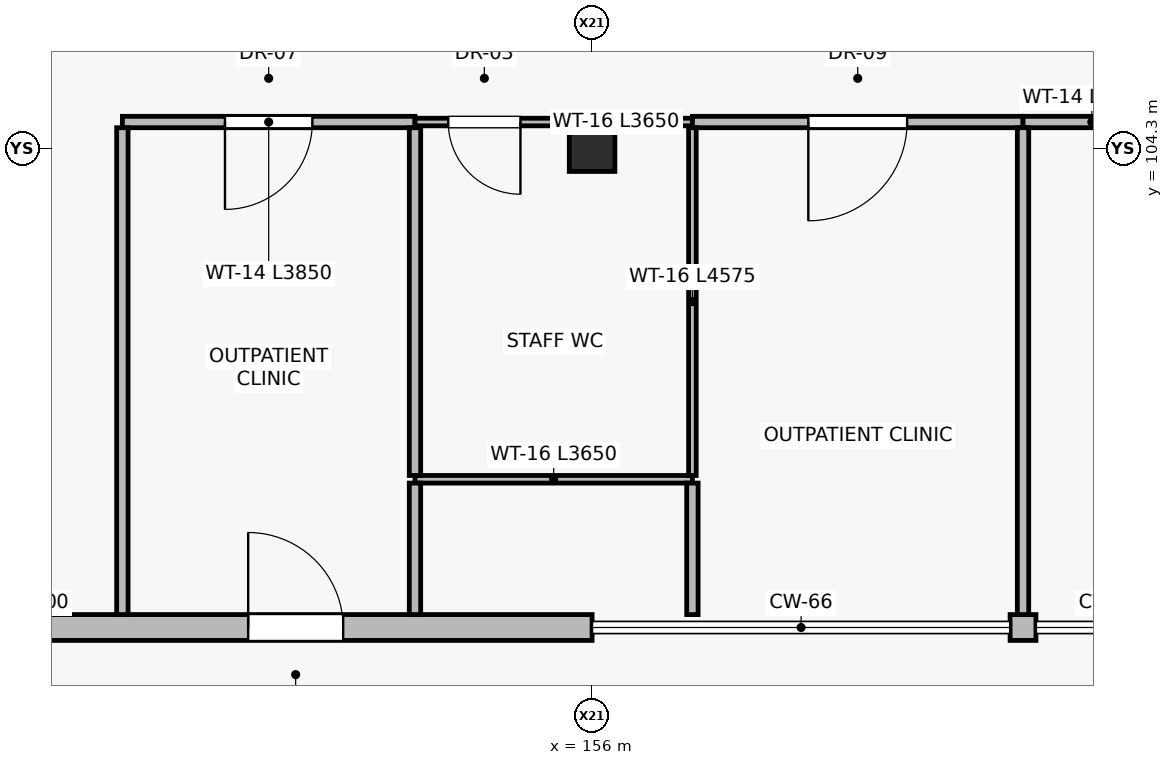
"""IFC4 building model, lengths in metres.
Left out: names, types, materials, properties, quantities, classifications, styles, units other than length and angle.
Written with IfcOpenShell. Run it as: python <this file> out.ifc"""

import sys

from ifc_helpers import new_model, si_unit, direction, frame, frame_2d, origin, origin_2d, place, context, subcontext, project, spatial, rectangle, extrude, element, fill, save


model = new_model("IFC4")
c1 = context("Model", 3, precision=1e-05, world=origin(), true_north=direction((0.0, 1.0)))
c2 = subcontext(c1, "Body", "Model", "MODEL_VIEW")
j1 = project(units=[si_unit("LENGTHUNIT", "METRE"), si_unit("PLANEANGLEUNIT", "RADIAN")], contexts=[c1])
p1 = place(None, origin())
s1 = spatial("IfcSite", under=j1, at=p1, CompositionType="ELEMENT")
p2 = place(p1, origin())
s2 = spatial("IfcBuilding", under=s1, at=p2, CompositionType="ELEMENT")
p3 = place(p2, frame((0.0, 0.0, 4.8)))
s3 = spatial("IfcBuildingStorey", under=s2, at=p3, CompositionType="ELEMENT", Elevation=4.8)
p4 = place(p3, frame((156.0, 104.3, 0.0), z_axis=(0.0, 0.0, 1.0), x_axis=(1.0, 0.0, 0.0)))
e1 = element("IfcColumn", 1, at=p4, inside=s3, PredefinedType="COLUMN", context=c2, shape_type="SweptSolid", body=[
    extrude(rectangle(XDim=0.6, YDim=0.6, at=origin_2d()), origin(), (0.0, 0.0, 1.0), 4.8),
])
p5 = place(p3, frame((156.0, 98.0, 0.0), z_axis=(0.0, 0.0, 1.0), x_axis=(-1.0, 0.0, 0.0)))
e2 = element("IfcWall", 2, at=p5, inside=s3, PredefinedType="STANDARD", context=c2, shape_type="SweptSolid", body=[
    extrude(rectangle(XDim=7.8, YDim=0.34, at=frame_2d((3.9, 0.0))), origin(), (0.0, 0.0, 1.0), 4.54),
])
p6 = place(p5, frame((3.275, 0.0, 0.0)))
e3 = element("IfcOpeningElement", 3, at=p6, cuts=e2, PredefinedType="OPENING", context=c2, shape_type="SweptSolid", body=[
    extrude(rectangle(XDim=1.25, YDim=2.2, at=frame_2d((0.625, 1.1))), frame((0.0, 0.18, 0.0), z_axis=(0.0, -1.0, 0.0), x_axis=(1.0, 0.0, 0.0)), (0.0, 0.0, 1.0), 0.36),
])
p7 = place(p3, frame((161.84, 98.0, 0.0), z_axis=(0.0, 0.0, 1.0), x_axis=(-1.0, 0.0, 0.0)))
e4 = element("IfcWall", 4, at=p7, inside=s3, PredefinedType="STANDARD", context=c2, shape_type="SweptSolid", body=[
    extrude(rectangle(XDim=0.34, YDim=0.34, at=frame_2d((0.17, 0.0))), origin(), (0.0, 0.0, 1.0), 4.54),
])
p8 = place(p3, frame((153.67, 104.65, 0.0), z_axis=(0.0, 0.0, 1.0), x_axis=(-1.0, 0.0, 0.0)))
e5 = element("IfcWall", 5, at=p8, inside=s3, PredefinedType="PARTITIONING", context=c2, shape_type="SweptSolid", body=[
    extrude(rectangle(XDim=3.85, YDim=0.15, at=frame_2d((1.925, 0.0))), origin(), (0.0, 0.0, 1.0), 4.04),
])
p9 = place(p8, frame((1.35, 0.0, 0.0)))
e6 = element("IfcOpeningElement", 6, at=p9, cuts=e5, PredefinedType="OPENING", context=c2, shape_type="SweptSolid", body=[
    extrude(rectangle(XDim=1.15, YDim=2.2, at=frame_2d((0.575, 1.1))), frame((0.0, 0.085, 0.0), z_axis=(0.0, -1.0, 0.0), x_axis=(1.0, 0.0, 0.0)), (0.0, 0.0, 1.0), 0.17),
])
p10 = place(p3, frame((157.32, 104.65, 0.0), z_axis=(0.0, 0.0, 1.0), x_axis=(-1.0, 0.0, 0.0)))
e7 = element("IfcWall", 7, at=p10, inside=s3, PredefinedType="PARTITIONING", context=c2, shape_type="SweptSolid", body=[
    extrude(rectangle(XDim=3.65, YDim=0.1, at=frame_2d((1.825, 0.0))), origin(), (0.0, 0.0, 1.0), 4.04),
])
p11 = place(p10, frame((2.262, 0.0, 0.0)))
e8 = element("IfcOpeningElement", 8, at=p11, cuts=e7, PredefinedType="OPENING", context=c2, shape_type="SweptSolid", body=[
    extrude(rectangle(XDim=0.95, YDim=2.1, at=frame_2d((0.475, 1.05))), frame((0.0, 0.06, 0.0), z_axis=(0.0, -1.0, 0.0), x_axis=(1.0, 0.0, 0.0)), (0.0, 0.0, 1.0), 0.12),
])
p12 = place(p3, frame((153.67, 99.95, 0.0), z_axis=(0.0, 0.0, 1.0), x_axis=(1.0, 0.0, 0.0)))
e9 = element("IfcWall", 9, at=p12, inside=s3, PredefinedType="PARTITIONING", context=c2, shape_type="SweptSolid", body=[
    extrude(rectangle(XDim=3.65, YDim=0.1, at=frame_2d((1.825, 0.0))), origin(), (0.0, 0.0, 1.0), 4.54),
])
p13 = place(p3, frame((161.67, 104.65, 0.0), z_axis=(0.0, 0.0, 1.0), x_axis=(-1.0, 0.0, 0.0)))
e10 = element("IfcWall", 10, at=p13, inside=s3, PredefinedType="PARTITIONING", context=c2, shape_type="SweptSolid", body=[
    extrude(rectangle(XDim=4.35, YDim=0.15, at=frame_2d((2.175, 0.0))), origin(), (0.0, 0.0, 1.0), 4.04),
])
p14 = place(p13, frame((1.525, 0.0, 0.0)))
e11 = element("IfcOpeningElement", 11, at=p14, cuts=e10, PredefinedType="OPENING", context=c2, shape_type="SweptSolid", body=[
    extrude(rectangle(XDim=1.3, YDim=2.2, at=frame_2d((0.65, 1.1))), frame((0.0, 0.085, 0.0), z_axis=(0.0, -1.0, 0.0), x_axis=(1.0, 0.0, 0.0)), (0.0, 0.0, 1.0), 0.17),
])
p15 = place(p3, frame((167.83, 104.65, 0.0), z_axis=(0.0, 0.0, 1.0), x_axis=(-1.0, 0.0, 0.0)))
e12 = element("IfcWall", 12, at=p15, inside=s3, PredefinedType="PARTITIONING", context=c2, shape_type="SweptSolid", body=[
    extrude(rectangle(XDim=6.16, YDim=0.15, at=frame_2d((3.08, 0.0))), origin(), (0.0, 0.0, 1.0), 4.04),
])
p16 = place(p15, frame((1.696, 0.0, 0.0)))
e13 = element("IfcOpeningElement", 13, at=p16, cuts=e12, PredefinedType="OPENING", context=c2, shape_type="SweptSolid", body=[
    extrude(rectangle(XDim=0.92, YDim=2.15, at=frame_2d((0.46, 1.075))), frame((0.0, 0.085, 0.0), z_axis=(0.0, -1.0, 0.0), x_axis=(1.0, 0.0, 0.0)), (0.0, 0.0, 1.0), 0.17),
])
p17 = place(p3, frame((149.82, 98.17, 0.0), z_axis=(0.0, 0.0, 1.0), x_axis=(0.0, 1.0, 0.0)))
e14 = element("IfcWall", 14, at=p17, inside=s3, PredefinedType="PARTITIONING", context=c2, shape_type="SweptSolid", body=[
    extrude(rectangle(XDim=6.405, YDim=0.15, at=frame_2d((3.203, 0.0))), origin(), (0.0, 0.0, 1.0), 4.54),
])
p18 = place(p3, frame((153.67, 98.17, 0.0), z_axis=(0.0, 0.0, 1.0), x_axis=(0.0, 1.0, 0.0)))
e15 = element("IfcWall", 15, at=p18, inside=s3, PredefinedType="PARTITIONING", context=c2, shape_type="SweptSolid", body=[
    extrude(rectangle(XDim=1.73, YDim=0.15, at=frame_2d((0.865, 0.0))), origin(), (0.0, 0.0, 1.0), 4.21),
])
p19 = place(p3, frame((153.67, 100.0, 0.0), z_axis=(0.0, 0.0, 1.0), x_axis=(0.0, 1.0, 0.0)))
e16 = element("IfcWall", 16, at=p19, inside=s3, PredefinedType="PARTITIONING", context=c2, shape_type="SweptSolid", body=[
    extrude(rectangle(XDim=4.575, YDim=0.15, at=frame_2d((2.288, 0.0))), origin(), (0.0, 0.0, 1.0), 4.21),
])
p20 = place(p3, frame((157.32, 100.0, 0.0), z_axis=(0.0, 0.0, 1.0), x_axis=(0.0, 1.0, 0.0)))
e17 = element("IfcWall", 17, at=p20, inside=s3, PredefinedType="PARTITIONING", context=c2, shape_type="SweptSolid", body=[
    extrude(rectangle(XDim=4.575, YDim=0.1, at=frame_2d((2.288, 0.0))), origin(), (0.0, 0.0, 1.0), 4.54),
])
p21 = place(p3, frame((157.32, 98.17, 0.0), z_axis=(0.0, 0.0, 1.0), x_axis=(0.0, 1.0, 0.0)))
e18 = element("IfcWall", 18, at=p21, inside=s3, PredefinedType="PARTITIONING", context=c2, shape_type="SweptSolid", body=[
    extrude(rectangle(XDim=1.73, YDim=0.15, at=frame_2d((0.865, 0.0))), origin(), (0.0, 0.0, 1.0), 4.54),
])
p22 = place(p3, frame((161.67, 98.17, 0.0), z_axis=(0.0, 0.0, 1.0), x_axis=(0.0, 1.0, 0.0)))
e19 = element("IfcWall", 19, at=p22, inside=s3, PredefinedType="PARTITIONING", context=c2, shape_type="SweptSolid", body=[
    extrude(rectangle(XDim=6.405, YDim=0.15, at=frame_2d((3.203, 0.0))), origin(), (0.0, 0.0, 1.0), 4.54),
])
p23 = place(p6, frame((1.25, 0.0, 0.0), z_axis=(0.0, 0.0, 1.0), x_axis=(-1.0, 0.0, 0.0)))
e20 = element("IfcDoor", 20, at=p23, inside=s3, OperationType="SINGLE_SWING_RIGHT", PredefinedType="DOOR", context=c2, shape_type="SweptSolid", body=[
    extrude(rectangle(XDim=1.25, YDim=2.2, at=frame_2d((0.625, 1.1))), frame((0.0, 0.025, 0.0), z_axis=(0.0, -1.0, 0.0), x_axis=(1.0, 0.0, 0.0)), (0.0, 0.0, 1.0), 0.05),
])
fill(e3, e20)
p24 = place(p9, origin())
e21 = element("IfcDoor", 21, at=p24, inside=s3, OperationType="SINGLE_SWING_RIGHT", PredefinedType="DOOR", context=c2, shape_type="SweptSolid", body=[
    extrude(rectangle(XDim=1.15, YDim=2.2, at=frame_2d((0.575, 1.1))), frame((0.0, 0.025, 0.0), z_axis=(0.0, -1.0, 0.0), x_axis=(1.0, 0.0, 0.0)), (0.0, 0.0, 1.0), 0.05),
])
fill(e6, e21)
p25 = place(p11, origin())
e22 = element("IfcDoor", 22, at=p25, inside=s3, OperationType="SINGLE_SWING_LEFT", PredefinedType="DOOR", context=c2, shape_type="SweptSolid", body=[
    extrude(rectangle(XDim=0.95, YDim=2.1, at=frame_2d((0.475, 1.05))), frame((0.0, 0.025, 0.0), z_axis=(0.0, -1.0, 0.0), x_axis=(1.0, 0.0, 0.0)), (0.0, 0.0, 1.0), 0.05),
])
fill(e8, e22)
p26 = place(p14, origin())
e23 = element("IfcDoor", 23, at=p26, inside=s3, OperationType="SINGLE_SWING_RIGHT", PredefinedType="DOOR", context=c2, shape_type="SweptSolid", body=[
    extrude(rectangle(XDim=1.3, YDim=2.2, at=frame_2d((0.65, 1.1))), frame((0.0, 0.025, 0.0), z_axis=(0.0, -1.0, 0.0), x_axis=(1.0, 0.0, 0.0)), (0.0, 0.0, 1.0), 0.05),
])
fill(e11, e23)
save(model, sys.argv[1])
